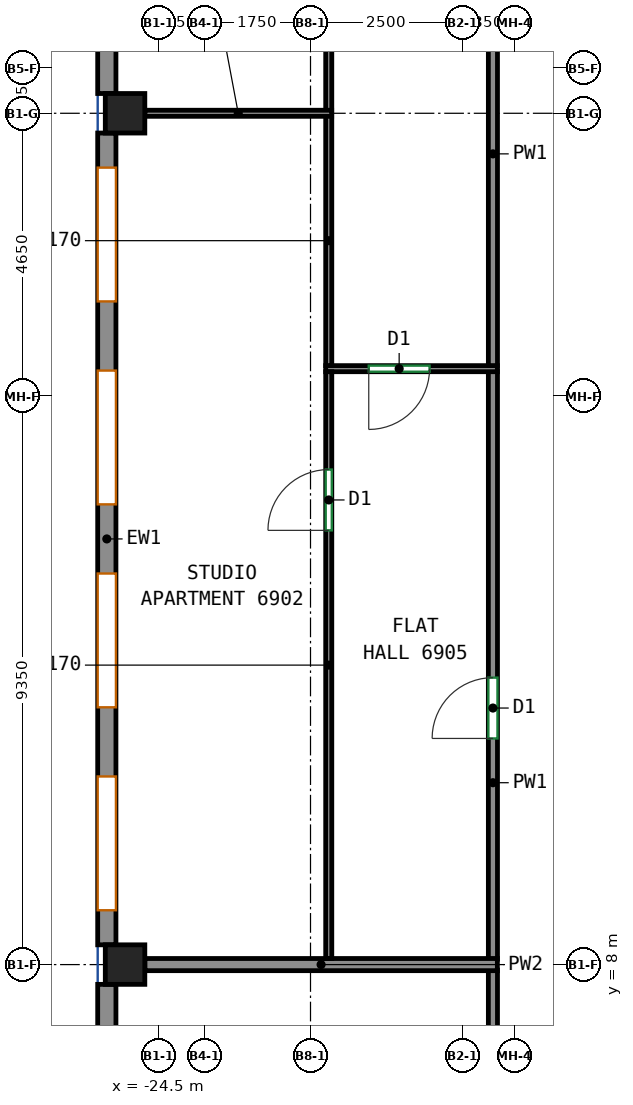
"""IFC4 building model, lengths in metres.
Left out: names, types, materials, properties, quantities, classifications, styles, units other than length and angle.
Written with IfcOpenShell. Run it as: python <this file> out.ifc"""

import sys

from ifc_helpers import new_model, si_unit, direction, frame, frame_2d, origin, origin_2d, place, context, subcontext, project, spatial, rectangle, extrude, source, transform, mapped, element, fill, save


model = new_model("IFC4")
c1 = context("Model", 3, precision=1e-05, world=origin(), true_north=direction((0.0, 1.0)))
c2 = subcontext(c1, "Body", "Model", "MODEL_VIEW")
j1 = project(units=[si_unit("LENGTHUNIT", "METRE"), si_unit("PLANEANGLEUNIT", "RADIAN")], contexts=[c1])
p1 = place(None, origin())
s1 = spatial("IfcSite", under=j1, at=p1, CompositionType="ELEMENT")
p2 = place(p1, origin())
s2 = spatial("IfcBuilding", under=s1, at=p2, CompositionType="ELEMENT")
p3 = place(p2, frame((0.0, 0.0, 280.6)))
s3 = spatial("IfcBuildingStorey", under=s2, at=p3, CompositionType="ELEMENT", Elevation=280.6)
m1 = source(origin(), c2, "Body", "SweptSolid", [
    extrude(rectangle(XDim=0.65, YDim=0.65, at=origin_2d()), origin(), (0.0, 0.0, 1.0), 3.12),
])
for number, where, z_axis, x_axis in (
    (1, (-25.05, 8.0, 0.0), (0.0, 0.0, 1.0), (1.0, 0.0, 0.0)),
    (2, (-25.05, 22.0, 0.0), (0.0, 0.0, 1.0), (1.0, 0.0, 0.0)),
):
    element("IfcColumn", number, at=place(p3, frame(where, z_axis=z_axis, x_axis=x_axis)), inside=s3, PredefinedType="COLUMN", context=c2, shape_type="MappedRepresentation", body=[
        mapped(m1, transform((0.0, 0.0, 0.0))),
    ])
m2 = source(origin(), c2, "Body", "SweptSolid", [
    extrude(rectangle(XDim=4.032, YDim=0.3, at=frame_2d((2.016, 0.0))), origin(), (0.0, 0.0, 1.0), 3.12),
])
p4 = place(p3, frame((-25.35, 26.357, 0.0), z_axis=(0.0, 0.0, 1.0), x_axis=(0.0, -1.0, 0.0)))
e3 = element("IfcWall", 3, at=p4, inside=s3, PredefinedType="SOLIDWALL", context=c2, shape_type="MappedRepresentation", body=[
    mapped(m2, transform((0.0, 0.0, 0.0))),
])
p5 = place(p4, frame((0.916, 0.0, 0.8)))
e4 = element("IfcOpeningElement", 4, at=p5, cuts=e3, PredefinedType="OPENING", context=c2, shape_type="SweptSolid", body=[
    extrude(rectangle(XDim=2.2, YDim=2.05, at=frame_2d((1.1, 1.025))), frame((0.0, 0.16, 0.0), z_axis=(0.0, -1.0, 0.0), x_axis=(1.0, 0.0, 0.0)), (0.0, 0.0, 1.0), 0.32),
])
m3 = source(origin(), c2, "Body", "SweptSolid", [
    extrude(rectangle(XDim=13.35, YDim=0.3, at=frame_2d((6.675, 0.0))), origin(), (0.0, 0.0, 1.0), 3.12),
])
p6 = place(p3, frame((-25.35, 21.675, 0.0), z_axis=(0.0, 0.0, 1.0), x_axis=(0.0, -1.0, 0.0)))
e5 = element("IfcWall", 5, at=p6, inside=s3, PredefinedType="SOLIDWALL", context=c2, shape_type="MappedRepresentation", body=[
    mapped(m3, transform((0.0, 0.0, 0.0))),
])
p7 = place(p6, frame((0.569, 0.0, 0.8)))
e6 = element("IfcOpeningElement", 6, at=p7, cuts=e5, PredefinedType="OPENING", context=c2, shape_type="SweptSolid", body=[
    extrude(rectangle(XDim=2.2, YDim=2.05, at=frame_2d((1.1, 1.025))), frame((0.0, 0.16, 0.0), z_axis=(0.0, -1.0, 0.0), x_axis=(1.0, 0.0, 0.0)), (0.0, 0.0, 1.0), 0.32),
])
p8 = place(p6, frame((3.906, 0.0, 0.8)))
e7 = element("IfcOpeningElement", 7, at=p8, cuts=e5, PredefinedType="OPENING", context=c2, shape_type="SweptSolid", body=[
    extrude(rectangle(XDim=2.2, YDim=2.05, at=frame_2d((1.1, 1.025))), frame((0.0, 0.16, 0.0), z_axis=(0.0, -1.0, 0.0), x_axis=(1.0, 0.0, 0.0)), (0.0, 0.0, 1.0), 0.32),
])
p9 = place(p6, frame((7.244, 0.0, 0.8)))
e8 = element("IfcOpeningElement", 8, at=p9, cuts=e5, PredefinedType="OPENING", context=c2, shape_type="SweptSolid", body=[
    extrude(rectangle(XDim=2.2, YDim=2.05, at=frame_2d((1.1, 1.025))), frame((0.0, 0.16, 0.0), z_axis=(0.0, -1.0, 0.0), x_axis=(1.0, 0.0, 0.0)), (0.0, 0.0, 1.0), 0.32),
])
p10 = place(p6, frame((10.581, 0.0, 0.8)))
e9 = element("IfcOpeningElement", 9, at=p10, cuts=e5, PredefinedType="OPENING", context=c2, shape_type="SweptSolid", body=[
    extrude(rectangle(XDim=2.2, YDim=2.05, at=frame_2d((1.1, 1.025))), frame((0.0, 0.16, 0.0), z_axis=(0.0, -1.0, 0.0), x_axis=(1.0, 0.0, 0.0)), (0.0, 0.0, 1.0), 0.32),
])
m4 = source(origin(), c2, "Body", "SweptSolid", [
    extrude(rectangle(XDim=8.183, YDim=0.3, at=frame_2d((4.092, 0.0))), origin(), (0.0, 0.0, 1.0), 3.12),
])
p11 = place(p3, frame((-25.35, 7.675, 0.0), z_axis=(0.0, 0.0, 1.0), x_axis=(0.0, -1.0, 0.0)))
e10 = element("IfcWall", 10, at=p11, inside=s3, PredefinedType="SOLIDWALL", context=c2, shape_type="MappedRepresentation", body=[
    mapped(m4, transform((0.0, 0.0, 0.0))),
])
p12 = place(p11, frame((0.946, 0.0, 0.8)))
e11 = element("IfcOpeningElement", 11, at=p12, cuts=e10, PredefinedType="OPENING", context=c2, shape_type="SweptSolid", body=[
    extrude(rectangle(XDim=2.2, YDim=2.05, at=frame_2d((1.1, 1.025))), frame((0.0, 0.16, 0.0), z_axis=(0.0, -1.0, 0.0), x_axis=(1.0, 0.0, 0.0)), (0.0, 0.0, 1.0), 0.32),
])
p13 = place(p11, frame((5.037, 0.0, 0.8)))
e12 = element("IfcOpeningElement", 12, at=p13, cuts=e10, PredefinedType="OPENING", context=c2, shape_type="SweptSolid", body=[
    extrude(rectangle(XDim=2.2, YDim=2.05, at=frame_2d((1.1, 1.025))), frame((0.0, 0.16, 0.0), z_axis=(0.0, -1.0, 0.0), x_axis=(1.0, 0.0, 0.0)), (0.0, 0.0, 1.0), 0.32),
])
p14 = place(p3, frame((-19.0, 4.332, 0.0), z_axis=(0.0, 0.0, 1.0), x_axis=(0.0, 1.0, 0.0)))
e13 = element("IfcWall", 13, at=p14, inside=s3, PredefinedType="PARTITIONING", context=c2, shape_type="SweptSolid", body=[
    extrude(rectangle(XDim=3.578, YDim=0.15, at=frame_2d((1.789, 0.0))), origin(), (0.0, 0.0, 1.0), 3.12),
])
p15 = place(p3, frame((-19.0, 8.09, 0.0), z_axis=(0.0, 0.0, 1.0), x_axis=(0.0, 1.0, 0.0)))
e14 = element("IfcWall", 14, at=p15, inside=s3, PredefinedType="PARTITIONING", context=c2, shape_type="SweptSolid", body=[
    extrude(rectangle(XDim=9.67, YDim=0.15, at=frame_2d((4.835, 0.0))), origin(), (0.0, 0.0, 1.0), 3.12),
])
p16 = place(p15, frame((3.629, 0.0, 0.0)))
e15 = element("IfcOpeningElement", 15, at=p16, cuts=e14, PredefinedType="OPENING", context=c2, shape_type="SweptSolid", body=[
    extrude(rectangle(XDim=1.0, YDim=2.1, at=frame_2d((0.5, 1.05))), frame((0.0, 0.085, 0.0), z_axis=(0.0, -1.0, 0.0), x_axis=(1.0, 0.0, 0.0)), (0.0, 0.0, 1.0), 0.17),
])
p17 = place(p3, frame((-19.0, 17.84, 0.0), z_axis=(0.0, 0.0, 1.0), x_axis=(0.0, 1.0, 0.0)))
e16 = element("IfcWall", 16, at=p17, inside=s3, PredefinedType="PARTITIONING", context=c2, shape_type="SweptSolid", body=[
    extrude(rectangle(XDim=6.985, YDim=0.15, at=frame_2d((3.492, 0.0))), origin(), (0.0, 0.0, 1.0), 3.12),
])
p18 = place(p3, frame((-24.725, 8.0, 0.0), z_axis=(0.0, 0.0, 1.0), x_axis=(1.0, 0.0, 0.0)))
e17 = element("IfcWall", 17, at=p18, inside=s3, PredefinedType="PARTITIONING", context=c2, shape_type="SweptSolid", body=[
    extrude(rectangle(XDim=5.798, YDim=0.2, at=frame_2d((2.899, 0.0))), origin(), (0.0, 0.0, 1.0), 2.57),
])
p19 = place(p3, frame((-18.927, 17.8, 0.0), z_axis=(0.0, 0.0, 1.0), x_axis=(-1.0, 0.0, 0.0)))
e18 = element("IfcWall", 18, at=p19, inside=s3, PredefinedType="PARTITIONING", context=c2, shape_type="SweptSolid", body=[
    extrude(rectangle(XDim=2.823, YDim=0.1, at=frame_2d((1.412, 0.0))), origin(), (0.0, 0.0, 1.0), 3.12),
])
p20 = place(p19, frame((1.115, 0.0, 0.0)))
e19 = element("IfcOpeningElement", 19, at=p20, cuts=e18, PredefinedType="OPENING", context=c2, shape_type="SweptSolid", body=[
    extrude(rectangle(XDim=1.0, YDim=2.1, at=frame_2d((0.5, 1.05))), frame((0.0, 0.06, 0.0), z_axis=(0.0, -1.0, 0.0), x_axis=(1.0, 0.0, 0.0)), (0.0, 0.0, 1.0), 0.12),
])
p21 = place(p3, frame((-21.7, 8.1, 0.0), z_axis=(0.0, 0.0, 1.0), x_axis=(0.0, 1.0, 0.0)))
e20 = element("IfcWall", 20, at=p21, inside=s3, PredefinedType="PARTITIONING", context=c2, shape_type="SweptSolid", body=[
    extrude(rectangle(XDim=9.65, YDim=0.1, at=frame_2d((4.825, 0.0))), origin(), (0.0, 0.0, 1.0), 2.57),
])
p22 = place(p21, frame((7.041, 0.0, 0.0)))
e21 = element("IfcOpeningElement", 21, at=p22, cuts=e20, PredefinedType="OPENING", context=c2, shape_type="SweptSolid", body=[
    extrude(rectangle(XDim=1.0, YDim=2.1, at=frame_2d((0.5, 1.05))), frame((0.0, 0.06, 0.0), z_axis=(0.0, -1.0, 0.0), x_axis=(1.0, 0.0, 0.0)), (0.0, 0.0, 1.0), 0.12),
])
p23 = place(p3, frame((-21.7, 17.85, 0.0), z_axis=(0.0, 0.0, 1.0), x_axis=(0.0, 1.0, 0.0)))
e22 = element("IfcWall", 22, at=p23, inside=s3, PredefinedType="PARTITIONING", context=c2, shape_type="SweptSolid", body=[
    extrude(rectangle(XDim=4.11, YDim=0.1, at=frame_2d((2.055, 0.0))), origin(), (0.0, 0.0, 1.0), 2.57),
])
p24 = place(p3, frame((-21.7, 22.04, 0.0), z_axis=(0.0, 0.0, 1.0), x_axis=(0.0, 1.0, 0.0)))
e23 = element("IfcWall", 23, at=p24, inside=s3, PredefinedType="PARTITIONING", context=c2, shape_type="SweptSolid", body=[
    extrude(rectangle(XDim=5.51, YDim=0.1, at=frame_2d((2.755, 0.0))), origin(), (0.0, 0.0, 1.0), 2.57),
])
p25 = place(p24, frame((3.809, 0.0, 0.0)))
e24 = element("IfcOpeningElement", 24, at=p25, cuts=e23, PredefinedType="OPENING", context=c2, shape_type="SweptSolid", body=[
    extrude(rectangle(XDim=0.9, YDim=2.1, at=frame_2d((0.45, 1.05))), frame((0.0, 0.06, 0.0), z_axis=(0.0, -1.0, 0.0), x_axis=(1.0, 0.0, 0.0)), (0.0, 0.0, 1.0), 0.12),
])
p26 = place(p3, frame((-21.652, 22.0, 0.0), z_axis=(0.0, 0.0, 1.0), x_axis=(-1.0, 0.0, 0.0)))
e25 = element("IfcWall", 25, at=p26, inside=s3, PredefinedType="PARTITIONING", context=c2, shape_type="SweptSolid", body=[
    extrude(rectangle(XDim=3.073, YDim=0.1, at=frame_2d((1.537, 0.0))), origin(), (0.0, 0.0, 1.0), 2.57),
])
p27 = place(p7, origin())
e26 = element("IfcWindow", 26, at=p27, inside=s3, PartitioningType="SINGLE_PANEL", PredefinedType="WINDOW", context=c2, shape_type="SweptSolid", body=[
    extrude(rectangle(XDim=2.2, YDim=2.05, at=frame_2d((1.1, 1.025))), frame((0.0, 0.03, 0.0), z_axis=(0.0, -1.0, 0.0), x_axis=(1.0, 0.0, 0.0)), (0.0, 0.0, 1.0), 0.06),
])
fill(e6, e26)
p28 = place(p8, origin())
e27 = element("IfcWindow", 27, at=p28, inside=s3, PartitioningType="SINGLE_PANEL", PredefinedType="WINDOW", context=c2, shape_type="SweptSolid", body=[
    extrude(rectangle(XDim=2.2, YDim=2.05, at=frame_2d((1.1, 1.025))), frame((0.0, 0.03, 0.0), z_axis=(0.0, -1.0, 0.0), x_axis=(1.0, 0.0, 0.0)), (0.0, 0.0, 1.0), 0.06),
])
fill(e7, e27)
p29 = place(p9, origin())
e28 = element("IfcWindow", 28, at=p29, inside=s3, PartitioningType="SINGLE_PANEL", PredefinedType="WINDOW", context=c2, shape_type="SweptSolid", body=[
    extrude(rectangle(XDim=2.2, YDim=2.05, at=frame_2d((1.1, 1.025))), frame((0.0, 0.03, 0.0), z_axis=(0.0, -1.0, 0.0), x_axis=(1.0, 0.0, 0.0)), (0.0, 0.0, 1.0), 0.06),
])
fill(e8, e28)
p30 = place(p10, origin())
e29 = element("IfcWindow", 29, at=p30, inside=s3, PartitioningType="SINGLE_PANEL", PredefinedType="WINDOW", context=c2, shape_type="SweptSolid", body=[
    extrude(rectangle(XDim=2.2, YDim=2.05, at=frame_2d((1.1, 1.025))), frame((0.0, 0.03, 0.0), z_axis=(0.0, -1.0, 0.0), x_axis=(1.0, 0.0, 0.0)), (0.0, 0.0, 1.0), 0.06),
])
fill(e9, e29)
p31 = place(p16, origin())
e30 = element("IfcDoor", 30, at=p31, inside=s3, OperationType="SINGLE_SWING_LEFT", PredefinedType="DOOR", context=c2, shape_type="SweptSolid", body=[
    extrude(rectangle(XDim=1.0, YDim=2.1, at=frame_2d((0.5, 1.05))), frame((0.0, 0.025, 0.0), z_axis=(0.0, -1.0, 0.0), x_axis=(1.0, 0.0, 0.0)), (0.0, 0.0, 1.0), 0.05),
])
fill(e15, e30)
p32 = place(p22, origin())
e31 = element("IfcDoor", 31, at=p32, inside=s3, OperationType="SINGLE_SWING_LEFT", PredefinedType="DOOR", context=c2, shape_type="SweptSolid", body=[
    extrude(rectangle(XDim=1.0, YDim=2.1, at=frame_2d((0.5, 1.05))), frame((0.0, 0.025, 0.0), z_axis=(0.0, -1.0, 0.0), x_axis=(1.0, 0.0, 0.0)), (0.0, 0.0, 1.0), 0.05),
])
fill(e21, e31)
p33 = place(p20, origin())
e32 = element("IfcDoor", 32, at=p33, inside=s3, OperationType="SINGLE_SWING_RIGHT", PredefinedType="DOOR", context=c2, shape_type="SweptSolid", body=[
    extrude(rectangle(XDim=1.0, YDim=2.1, at=frame_2d((0.5, 1.05))), frame((0.0, 0.025, 0.0), z_axis=(0.0, -1.0, 0.0), x_axis=(1.0, 0.0, 0.0)), (0.0, 0.0, 1.0), 0.05),
])
fill(e19, e32)
save(model, sys.argv[1])
